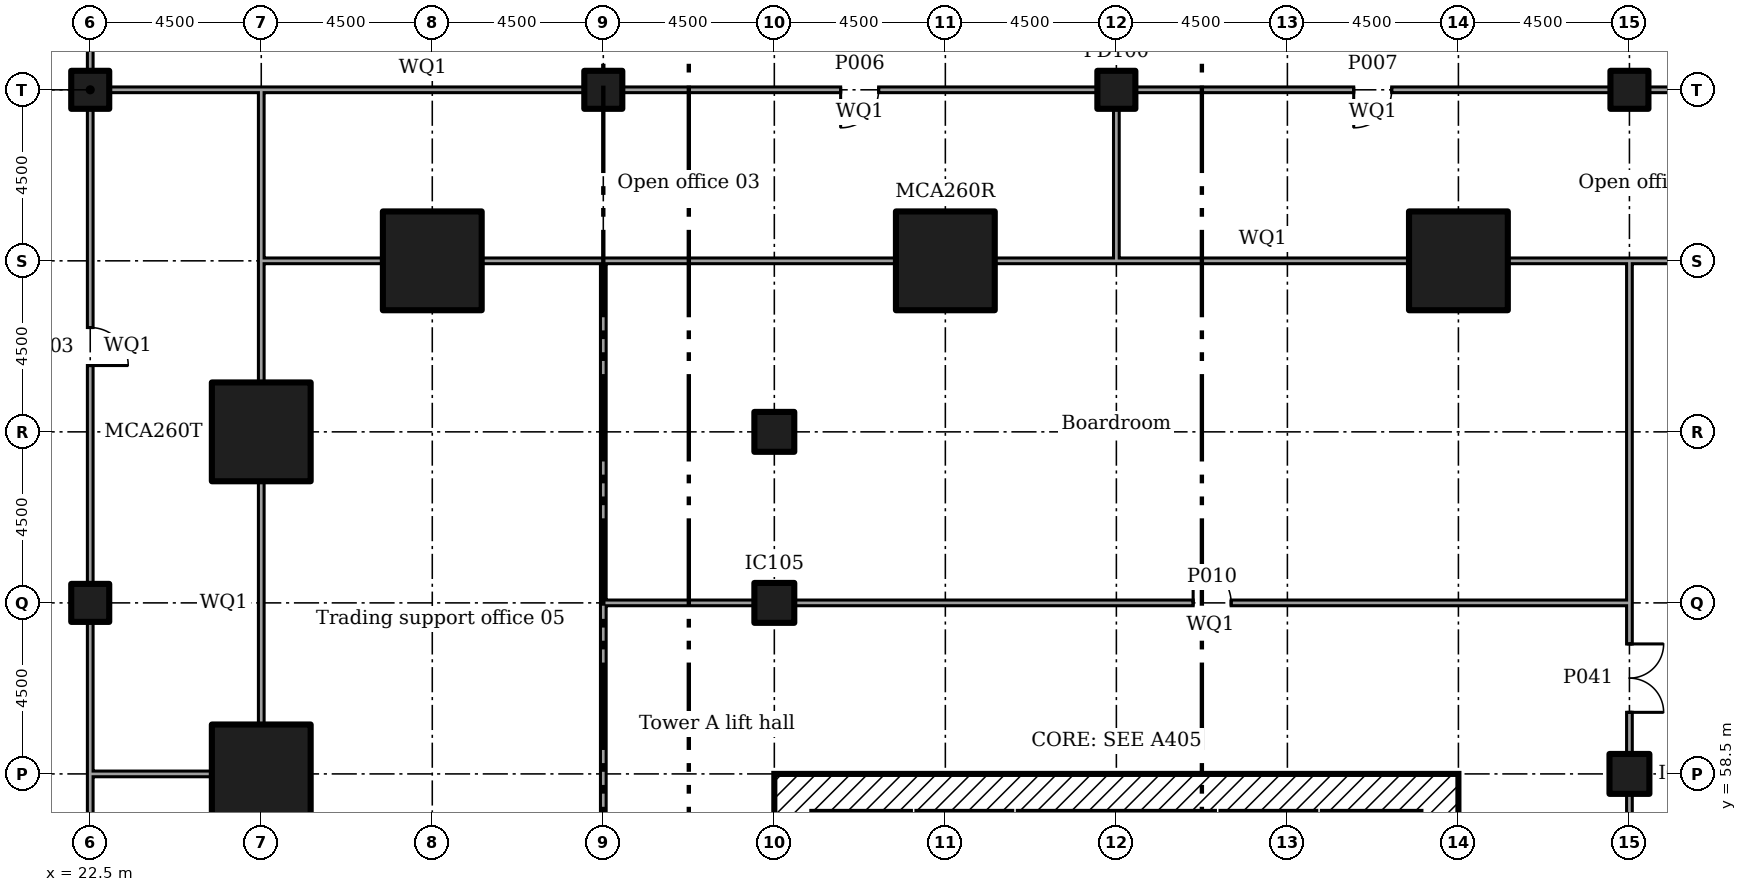
"""IFC4 building model, lengths in metres.
Left out: names, types, materials, properties, quantities, classifications, styles, units other than length and angle.
Written with IfcOpenShell. Run it as: python <this file> out.ifc"""

import sys

from ifc_helpers import new_model, si_unit, direction, frame, frame_2d, origin, origin_2d, place, context, subcontext, project, spatial, rectangle, extrude, element, fill, save


model = new_model("IFC4")
c1 = context("Model", 3, precision=1e-05, world=origin(), true_north=direction((0.0, 1.0)))
c2 = subcontext(c1, "Body", "Model", "MODEL_VIEW")
j1 = project(units=[si_unit("LENGTHUNIT", "METRE"), si_unit("PLANEANGLEUNIT", "RADIAN")], contexts=[c1])
p1 = place(None, origin())
s1 = spatial("IfcSite", under=j1, at=p1, CompositionType="ELEMENT")
p2 = place(p1, origin())
s2 = spatial("IfcBuilding", under=s1, at=p2, CompositionType="ELEMENT")
p3 = place(p2, frame((0.0, 0.0, 11.5)))
s3 = spatial("IfcBuildingStorey", under=s2, at=p3, CompositionType="ELEMENT", Elevation=11.5)
for number, where in (
    (1, (27.0, 58.5, 0.0)),
    (2, (27.0, 67.5, 0.0)),
    (3, (31.5, 72.0, 0.0)),
    (4, (45.0, 72.0, 0.0)),
    (5, (58.5, 72.0, 0.0)),
):
    element("IfcColumn", number, at=place(p3, frame(where)), inside=s3, PredefinedType="COLUMN", context=c2, shape_type="SweptSolid", body=[
        extrude(rectangle(XDim=2.6, YDim=2.6, at=origin_2d()), origin(), (0.0, 0.0, 1.0), 5.0),
    ])
for number, where in (
    (6, (40.5, 63.0, 0.0)),
    (7, (40.5, 67.5, 0.0)),
    (8, (63.0, 58.5, 0.0)),
):
    element("IfcColumn", number, at=place(p3, frame(where)), inside=s3, PredefinedType="COLUMN", context=c2, shape_type="SweptSolid", body=[
        extrude(rectangle(XDim=1.05, YDim=1.05, at=origin_2d()), origin(), (0.0, 0.0, 1.0), 5.0),
    ])
for number, where in (
    (9, (22.5, 63.0, 0.0)),
    (10, (22.5, 76.5, 0.0)),
    (11, (36.0, 76.5, 0.0)),
    (12, (49.5, 76.5, 0.0)),
    (13, (63.0, 76.5, 0.0)),
):
    element("IfcColumn", number, at=place(p3, frame(where)), inside=s3, PredefinedType="COLUMN", context=c2, shape_type="SweptSolid", body=[
        extrude(rectangle(XDim=1.0, YDim=1.0, at=origin_2d()), origin(), (0.0, 0.0, 1.0), 5.0),
    ])
p4 = place(p3, frame((58.0, 40.5, 0.0), z_axis=(0.0, 0.0, 1.0), x_axis=(0.0, 1.0, 0.0)))
e14 = element("IfcWall", 14, at=p4, inside=s3, PredefinedType="SHEAR", context=c2, shape_type="SweptSolid", body=[
    extrude(rectangle(XDim=18.0, YDim=1.0, at=frame_2d((9.0, 0.0))), origin(), (0.0, 0.0, 1.0), 4.5),
])
p5 = place(p4, frame((13.15, 0.0, 0.0)))
e15 = element("IfcOpeningElement", 15, at=p5, cuts=e14, PredefinedType="OPENING", context=c2, shape_type="SweptSolid", body=[
    extrude(rectangle(XDim=1.2, YDim=2.1, at=frame_2d((0.6, 1.05))), frame((0.0, 0.51, 0.0), z_axis=(0.0, -1.0, 0.0), x_axis=(1.0, 0.0, 0.0)), (0.0, 0.0, 1.0), 1.02),
])
p6 = place(p4, frame((3.9, 0.0, 0.0)))
e16 = element("IfcOpeningElement", 16, at=p6, cuts=e14, PredefinedType="OPENING", context=c2, shape_type="SweptSolid", body=[
    extrude(rectangle(XDim=1.8, YDim=2.1, at=frame_2d((0.9, 1.05))), frame((0.0, 0.51, 0.0), z_axis=(0.0, -1.0, 0.0), x_axis=(1.0, 0.0, 0.0)), (0.0, 0.0, 1.0), 1.02),
])
p7 = place(p4, frame((11.525, 0.0, 0.0)))
e17 = element("IfcOpeningElement", 17, at=p7, cuts=e14, PredefinedType="OPENING", context=c2, shape_type="SweptSolid", body=[
    extrude(rectangle(XDim=1.0, YDim=2.1, at=frame_2d((0.5, 1.05))), frame((0.0, 0.51, 0.0), z_axis=(0.0, -1.0, 0.0), x_axis=(1.0, 0.0, 0.0)), (0.0, 0.0, 1.0), 1.02),
])
p8 = place(p3, frame((41.5, 58.0, 0.0)))
e18 = element("IfcWall", 18, at=p8, inside=s3, PredefinedType="SHEAR", context=c2, shape_type="SweptSolid", body=[
    extrude(rectangle(XDim=16.0, YDim=1.0, at=frame_2d((8.0, 0.0))), origin(), (0.0, 0.0, 1.0), 4.5),
])
p9 = place(p3, frame((41.0, 40.5, 0.0), z_axis=(0.0, 0.0, 1.0), x_axis=(0.0, 1.0, 0.0)))
e19 = element("IfcWall", 19, at=p9, inside=s3, PredefinedType="SHEAR", context=c2, shape_type="SweptSolid", body=[
    extrude(rectangle(XDim=18.0, YDim=1.0, at=frame_2d((9.0, 0.0))), origin(), (0.0, 0.0, 1.0), 4.5),
])
p10 = place(p9, frame((3.65, 0.0, 0.0)))
e20 = element("IfcOpeningElement", 20, at=p10, cuts=e19, PredefinedType="OPENING", context=c2, shape_type="SweptSolid", body=[
    extrude(rectangle(XDim=1.2, YDim=2.1, at=frame_2d((0.6, 1.05))), frame((0.0, 0.51, 0.0), z_axis=(0.0, -1.0, 0.0), x_axis=(1.0, 0.0, 0.0)), (0.0, 0.0, 1.0), 1.02),
])
p11 = place(p9, frame((5.475, 0.0, 0.0)))
e21 = element("IfcOpeningElement", 21, at=p11, cuts=e19, PredefinedType="OPENING", context=c2, shape_type="SweptSolid", body=[
    extrude(rectangle(XDim=1.0, YDim=2.1, at=frame_2d((0.5, 1.05))), frame((0.0, 0.51, 0.0), z_axis=(0.0, -1.0, 0.0), x_axis=(1.0, 0.0, 0.0)), (0.0, 0.0, 1.0), 1.02),
])
p12 = place(p9, frame((12.3, 0.0, 0.0)))
e22 = element("IfcOpeningElement", 22, at=p12, cuts=e19, PredefinedType="OPENING", context=c2, shape_type="SweptSolid", body=[
    extrude(rectangle(XDim=1.0, YDim=2.1, at=frame_2d((0.5, 1.05))), frame((0.0, 0.51, 0.0), z_axis=(0.0, -1.0, 0.0), x_axis=(1.0, 0.0, 0.0)), (0.0, 0.0, 1.0), 1.02),
])
for number, where, z_axis, x_axis in (
    (23, (52.167, 57.5, 0.0), (0.0, 0.0, 1.0), (0.0, -1.0, 0.0)),
    (24, (54.833, 57.5, 0.0), (0.0, 0.0, 1.0), (0.0, -1.0, 0.0)),
):
    element("IfcWall", number, at=place(p3, frame(where, z_axis=z_axis, x_axis=x_axis)), inside=s3, PredefinedType="SHEAR", context=c2, shape_type="SweptSolid", body=[
        extrude(rectangle(XDim=2.3, YDim=0.2, at=frame_2d((1.15, 0.0))), origin(), (0.0, 0.0, 1.0), 4.5),
    ])
p13 = place(p3, frame((22.5, 76.995, 0.0), z_axis=(0.0, 0.0, 1.0), x_axis=(0.0, 1.0, 0.0)))
e25 = element("IfcWall", 25, at=p13, inside=s3, PredefinedType="PARTITIONING", context=c2, shape_type="SweptSolid", body=[
    extrude(rectangle(XDim=3.705, YDim=0.15, at=frame_2d((1.853, 0.0))), origin(), (0.0, 0.0, 1.0), 4.55),
])
p14 = place(p13, frame((1.25, 0.0, 0.0)))
e26 = element("IfcOpeningElement", 26, at=p14, cuts=e25, PredefinedType="OPENING", context=c2, shape_type="SweptSolid", body=[
    extrude(rectangle(XDim=1.2, YDim=2.1, at=frame_2d((0.6, 1.05))), frame((0.0, 0.085, 0.0), z_axis=(0.0, -1.0, 0.0), x_axis=(1.0, 0.0, 0.0)), (0.0, 0.0, 1.0), 0.17),
])
p15 = place(p3, frame((22.5, 49.995, 0.0), z_axis=(0.0, 0.0, 1.0), x_axis=(0.0, 1.0, 0.0)))
e27 = element("IfcWall", 27, at=p15, inside=s3, PredefinedType="PARTITIONING", context=c2, shape_type="SweptSolid", body=[
    extrude(rectangle(XDim=8.58, YDim=0.15, at=frame_2d((4.29, 0.0))), origin(), (0.0, 0.0, 1.0), 4.55),
])
p16 = place(p3, frame((22.5, 58.5, 0.0), z_axis=(0.0, 0.0, 1.0), x_axis=(0.0, 1.0, 0.0)))
e28 = element("IfcWall", 28, at=p16, inside=s3, PredefinedType="PARTITIONING", context=c2, shape_type="SweptSolid", body=[
    extrude(rectangle(XDim=4.005, YDim=0.15, at=frame_2d((2.002, 0.0))), origin(), (0.0, 0.0, 1.0), 4.55),
])
p17 = place(p3, frame((22.5, 63.495, 0.0), z_axis=(0.0, 0.0, 1.0), x_axis=(0.0, 1.0, 0.0)))
e29 = element("IfcWall", 29, at=p17, inside=s3, PredefinedType="PARTITIONING", context=c2, shape_type="SweptSolid", body=[
    extrude(rectangle(XDim=12.51, YDim=0.15, at=frame_2d((6.255, 0.0))), origin(), (0.0, 0.0, 1.0), 4.55),
])
p18 = place(p17, frame((5.75, 0.0, 0.0)))
e30 = element("IfcOpeningElement", 30, at=p18, cuts=e29, PredefinedType="OPENING", context=c2, shape_type="SweptSolid", body=[
    extrude(rectangle(XDim=1.0, YDim=2.1, at=frame_2d((0.5, 1.05))), frame((0.0, 0.085, 0.0), z_axis=(0.0, -1.0, 0.0), x_axis=(1.0, 0.0, 0.0)), (0.0, 0.0, 1.0), 0.17),
])
p19 = place(p3, frame((22.995, 76.5, 0.0)))
e31 = element("IfcWall", 31, at=p19, inside=s3, PredefinedType="PARTITIONING", context=c2, shape_type="SweptSolid", body=[
    extrude(rectangle(XDim=4.08, YDim=0.15, at=frame_2d((2.04, 0.0))), origin(), (0.0, 0.0, 1.0), 4.55),
])
p20 = place(p3, frame((27.0, 76.5, 0.0)))
e32 = element("IfcWall", 32, at=p20, inside=s3, PredefinedType="PARTITIONING", context=c2, shape_type="SweptSolid", body=[
    extrude(rectangle(XDim=8.505, YDim=0.15, at=frame_2d((4.252, 0.0))), origin(), (0.0, 0.0, 1.0), 4.55),
])
p21 = place(p3, frame((36.495, 76.5, 0.0)))
e33 = element("IfcWall", 33, at=p21, inside=s3, PredefinedType="PARTITIONING", context=c2, shape_type="SweptSolid", body=[
    extrude(rectangle(XDim=12.51, YDim=0.15, at=frame_2d((6.255, 0.0))), origin(), (0.0, 0.0, 1.0), 4.55),
])
p22 = place(p21, frame((5.75, 0.0, 0.0)))
e34 = element("IfcOpeningElement", 34, at=p22, cuts=e33, PredefinedType="OPENING", context=c2, shape_type="SweptSolid", body=[
    extrude(rectangle(XDim=1.0, YDim=2.1, at=frame_2d((0.5, 1.05))), frame((0.0, 0.085, 0.0), z_axis=(0.0, -1.0, 0.0), x_axis=(1.0, 0.0, 0.0)), (0.0, 0.0, 1.0), 0.17),
])
p23 = place(p3, frame((49.995, 76.5, 0.0)))
e35 = element("IfcWall", 35, at=p23, inside=s3, PredefinedType="PARTITIONING", context=c2, shape_type="SweptSolid", body=[
    extrude(rectangle(XDim=12.51, YDim=0.15, at=frame_2d((6.255, 0.0))), origin(), (0.0, 0.0, 1.0), 4.55),
])
p24 = place(p23, frame((5.75, 0.0, 0.0)))
e36 = element("IfcOpeningElement", 36, at=p24, cuts=e35, PredefinedType="OPENING", context=c2, shape_type="SweptSolid", body=[
    extrude(rectangle(XDim=1.0, YDim=2.1, at=frame_2d((0.5, 1.05))), frame((0.0, 0.085, 0.0), z_axis=(0.0, -1.0, 0.0), x_axis=(1.0, 0.0, 0.0)), (0.0, 0.0, 1.0), 0.17),
])
p25 = place(p3, frame((63.495, 76.5, 0.0)))
e37 = element("IfcWall", 37, at=p25, inside=s3, PredefinedType="PARTITIONING", context=c2, shape_type="SweptSolid", body=[
    extrude(rectangle(XDim=8.58, YDim=0.15, at=frame_2d((4.29, 0.0))), origin(), (0.0, 0.0, 1.0), 4.55),
])
p26 = place(p3, frame((22.575, 58.5, 0.0)))
e38 = element("IfcWall", 38, at=p26, inside=s3, PredefinedType="PARTITIONING", context=c2, shape_type="SweptSolid", body=[
    extrude(rectangle(XDim=3.13, YDim=0.15, at=frame_2d((1.565, 0.0))), origin(), (0.0, 0.0, 1.0), 4.55),
])
p27 = place(p3, frame((27.0, 71.925, 0.0), z_axis=(0.0, 0.0, 1.0), x_axis=(0.0, 1.0, 0.0)))
e39 = element("IfcWall", 39, at=p27, inside=s3, PredefinedType="PARTITIONING", context=c2, shape_type="SweptSolid", body=[
    extrude(rectangle(XDim=4.5, YDim=0.15, at=frame_2d((2.25, 0.0))), origin(), (0.0, 0.0, 1.0), 4.55),
])
p28 = place(p3, frame((27.0, 59.795, 0.0), z_axis=(0.0, 0.0, 1.0), x_axis=(0.0, 1.0, 0.0)))
e40 = element("IfcWall", 40, at=p28, inside=s3, PredefinedType="PARTITIONING", context=c2, shape_type="SweptSolid", body=[
    extrude(rectangle(XDim=6.41, YDim=0.15, at=frame_2d((3.205, 0.0))), origin(), (0.0, 0.0, 1.0), 4.55),
])
p29 = place(p3, frame((27.0, 68.795, 0.0), z_axis=(0.0, 0.0, 1.0), x_axis=(0.0, 1.0, 0.0)))
e41 = element("IfcWall", 41, at=p29, inside=s3, PredefinedType="PARTITIONING", context=c2, shape_type="SweptSolid", body=[
    extrude(rectangle(XDim=3.205, YDim=0.15, at=frame_2d((1.603, 0.0))), origin(), (0.0, 0.0, 1.0), 4.55),
])
p30 = place(p3, frame((49.5, 71.925, 0.0), z_axis=(0.0, 0.0, 1.0), x_axis=(0.0, 1.0, 0.0)))
e42 = element("IfcWall", 42, at=p30, inside=s3, PredefinedType="PARTITIONING", context=c2, shape_type="SweptSolid", body=[
    extrude(rectangle(XDim=4.08, YDim=0.15, at=frame_2d((2.04, 0.0))), origin(), (0.0, 0.0, 1.0), 4.55),
])
p31 = place(p3, frame((35.925, 72.0, 0.0)))
e43 = element("IfcWall", 43, at=p31, inside=s3, PredefinedType="PARTITIONING", context=c2, shape_type="SweptSolid", body=[
    extrude(rectangle(XDim=7.78, YDim=0.15, at=frame_2d((3.89, 0.0))), origin(), (0.0, 0.0, 1.0), 4.55),
])
for number, where in (
    (44, (46.295, 72.0, 0.0)),
    (45, (27.075, 72.0, 0.0)),
):
    element("IfcWall", number, at=place(p3, frame(where)), inside=s3, PredefinedType="PARTITIONING", context=c2, shape_type="SweptSolid", body=[
        extrude(rectangle(XDim=3.13, YDim=0.15, at=frame_2d((1.565, 0.0))), origin(), (0.0, 0.0, 1.0), 4.55),
    ])
p32 = place(p3, frame((32.795, 72.0, 0.0)))
e46 = element("IfcWall", 46, at=p32, inside=s3, PredefinedType="PARTITIONING", context=c2, shape_type="SweptSolid", body=[
    extrude(rectangle(XDim=3.205, YDim=0.15, at=frame_2d((1.603, 0.0))), origin(), (0.0, 0.0, 1.0), 4.55),
])
p33 = place(p3, frame((62.925, 72.0, 0.0)))
e47 = element("IfcWall", 47, at=p33, inside=s3, PredefinedType="PARTITIONING", context=c2, shape_type="SweptSolid", body=[
    extrude(rectangle(XDim=3.28, YDim=0.15, at=frame_2d((1.64, 0.0))), origin(), (0.0, 0.0, 1.0), 4.55),
])
p34 = place(p3, frame((49.5, 72.0, 0.0)))
e48 = element("IfcWall", 48, at=p34, inside=s3, PredefinedType="PARTITIONING", context=c2, shape_type="SweptSolid", body=[
    extrude(rectangle(XDim=7.705, YDim=0.15, at=frame_2d((3.853, 0.0))), origin(), (0.0, 0.0, 1.0), 4.55),
])
p35 = place(p3, frame((59.795, 72.0, 0.0)))
e49 = element("IfcWall", 49, at=p35, inside=s3, PredefinedType="PARTITIONING", context=c2, shape_type="SweptSolid", body=[
    extrude(rectangle(XDim=3.205, YDim=0.15, at=frame_2d((1.603, 0.0))), origin(), (0.0, 0.0, 1.0), 4.55),
])
p36 = place(p3, frame((63.0, 62.925, 0.0), z_axis=(0.0, 0.0, 1.0), x_axis=(0.0, 1.0, 0.0)))
e50 = element("IfcWall", 50, at=p36, inside=s3, PredefinedType="PARTITIONING", context=c2, shape_type="SweptSolid", body=[
    extrude(rectangle(XDim=9.0, YDim=0.15, at=frame_2d((4.5, 0.0))), origin(), (0.0, 0.0, 1.0), 4.55),
])
p37 = place(p3, frame((63.0, 36.0, 0.0), z_axis=(0.0, 0.0, 1.0), x_axis=(0.0, 1.0, 0.0)))
e51 = element("IfcWall", 51, at=p37, inside=s3, PredefinedType="PARTITIONING", context=c2, shape_type="SweptSolid", body=[
    extrude(rectangle(XDim=21.98, YDim=0.15, at=frame_2d((10.99, 0.0))), origin(), (0.0, 0.0, 1.0), 4.55),
])
p38 = place(p37, frame((10.1, 0.0, 0.0)))
e52 = element("IfcOpeningElement", 52, at=p38, cuts=e51, PredefinedType="OPENING", context=c2, shape_type="SweptSolid", body=[
    extrude(rectangle(XDim=1.8, YDim=2.1, at=frame_2d((0.9, 1.05))), frame((0.0, 0.085, 0.0), z_axis=(0.0, -1.0, 0.0), x_axis=(1.0, 0.0, 0.0)), (0.0, 0.0, 1.0), 0.17),
])
p39 = place(p3, frame((63.0, 59.02, 0.0), z_axis=(0.0, 0.0, 1.0), x_axis=(0.0, 1.0, 0.0)))
e53 = element("IfcWall", 53, at=p39, inside=s3, PredefinedType="PARTITIONING", context=c2, shape_type="SweptSolid", body=[
    extrude(rectangle(XDim=3.98, YDim=0.15, at=frame_2d((1.99, 0.0))), origin(), (0.0, 0.0, 1.0), 4.55),
])
p40 = place(p39, frame((1.1, 0.0, 0.0)))
e54 = element("IfcOpeningElement", 54, at=p40, cuts=e53, PredefinedType="OPENING", context=c2, shape_type="SweptSolid", body=[
    extrude(rectangle(XDim=1.8, YDim=2.1, at=frame_2d((0.9, 1.05))), frame((0.0, 0.085, 0.0), z_axis=(0.0, -1.0, 0.0), x_axis=(1.0, 0.0, 0.0)), (0.0, 0.0, 1.0), 0.17),
])
p41 = place(p3, frame((36.0, 62.925, 0.0), z_axis=(0.0, 0.0, 1.0), x_axis=(0.0, 1.0, 0.0)))
e55 = element("IfcWall", 55, at=p41, inside=s3, PredefinedType="PARTITIONING", context=c2, shape_type="SweptSolid", body=[
    extrude(rectangle(XDim=9.0, YDim=0.15, at=frame_2d((4.5, 0.0))), origin(), (0.0, 0.0, 1.0), 4.55),
])
p42 = place(p3, frame((36.075, 63.0, 0.0)))
e56 = element("IfcWall", 56, at=p42, inside=s3, PredefinedType="PARTITIONING", context=c2, shape_type="SweptSolid", body=[
    extrude(rectangle(XDim=3.905, YDim=0.15, at=frame_2d((1.953, 0.0))), origin(), (0.0, 0.0, 1.0), 4.55),
])
p43 = place(p3, frame((41.02, 63.0, 0.0)))
e57 = element("IfcWall", 57, at=p43, inside=s3, PredefinedType="PARTITIONING", context=c2, shape_type="SweptSolid", body=[
    extrude(rectangle(XDim=21.905, YDim=0.15, at=frame_2d((10.953, 0.0))), origin(), (0.0, 0.0, 1.0), 4.55),
])
p44 = place(p43, frame((10.5, 0.0, 0.0)))
e58 = element("IfcOpeningElement", 58, at=p44, cuts=e57, PredefinedType="OPENING", context=c2, shape_type="SweptSolid", body=[
    extrude(rectangle(XDim=1.0, YDim=2.1, at=frame_2d((0.5, 1.05))), frame((0.0, 0.085, 0.0), z_axis=(0.0, -1.0, 0.0), x_axis=(1.0, 0.0, 0.0)), (0.0, 0.0, 1.0), 0.17),
])
p45 = place(p3, frame((36.0, 49.5, 0.0), z_axis=(0.0, 0.0, 1.0), x_axis=(0.0, 1.0, 0.0)))
e59 = element("IfcWall", 59, at=p45, inside=s3, PredefinedType="PARTITIONING", context=c2, shape_type="SweptSolid", body=[
    extrude(rectangle(XDim=13.5, YDim=0.15, at=frame_2d((6.75, 0.0))), origin(), (0.0, 0.0, 1.0), 4.55),
])
p46 = place(p45, frame((6.25, 0.0, 0.0)))
e60 = element("IfcOpeningElement", 60, at=p46, cuts=e59, PredefinedType="OPENING", context=c2, shape_type="SweptSolid", body=[
    extrude(rectangle(XDim=1.0, YDim=2.1, at=frame_2d((0.5, 1.05))), frame((0.0, 0.085, 0.0), z_axis=(0.0, -1.0, 0.0), x_axis=(1.0, 0.0, 0.0)), (0.0, 0.0, 1.0), 0.17),
])
p47 = place(p18, frame((1.0, 0.0, 0.0), x_axis=(-1.0, 0.0, 0.0)))
e61 = element("IfcDoor", 61, at=p47, inside=s3, OperationType="SINGLE_SWING_LEFT", PredefinedType="DOOR", context=c2, shape_type="SweptSolid", body=[
    extrude(rectangle(XDim=1.0, YDim=2.1, at=frame_2d((0.5, 1.05))), frame((0.0, 0.025, 0.0), z_axis=(0.0, -1.0, 0.0), x_axis=(1.0, 0.0, 0.0)), (0.0, 0.0, 1.0), 0.05),
])
fill(e30, e61)
p48 = place(p22, frame((1.0, 0.0, 0.0), x_axis=(-1.0, 0.0, 0.0)))
e62 = element("IfcDoor", 62, at=p48, inside=s3, OperationType="SINGLE_SWING_LEFT", PredefinedType="DOOR", context=c2, shape_type="SweptSolid", body=[
    extrude(rectangle(XDim=1.0, YDim=2.1, at=frame_2d((0.5, 1.05))), frame((0.0, 0.025, 0.0), z_axis=(0.0, -1.0, 0.0), x_axis=(1.0, 0.0, 0.0)), (0.0, 0.0, 1.0), 0.05),
])
fill(e34, e62)
p49 = place(p24, frame((1.0, 0.0, 0.0), x_axis=(-1.0, 0.0, 0.0)))
e63 = element("IfcDoor", 63, at=p49, inside=s3, OperationType="SINGLE_SWING_LEFT", PredefinedType="DOOR", context=c2, shape_type="SweptSolid", body=[
    extrude(rectangle(XDim=1.0, YDim=2.1, at=frame_2d((0.5, 1.05))), frame((0.0, 0.025, 0.0), z_axis=(0.0, -1.0, 0.0), x_axis=(1.0, 0.0, 0.0)), (0.0, 0.0, 1.0), 0.05),
])
fill(e36, e63)
p50 = place(p44, origin())
e64 = element("IfcDoor", 64, at=p50, inside=s3, OperationType="SINGLE_SWING_RIGHT", PredefinedType="DOOR", context=c2, shape_type="SweptSolid", body=[
    extrude(rectangle(XDim=1.0, YDim=2.1, at=frame_2d((0.5, 1.05))), frame((0.0, 0.025, 0.0), z_axis=(0.0, -1.0, 0.0), x_axis=(1.0, 0.0, 0.0)), (0.0, 0.0, 1.0), 0.05),
])
fill(e58, e64)
p51 = place(p40, frame((1.8, 0.0, 0.0), x_axis=(-1.0, 0.0, 0.0)))
e65 = element("IfcDoor", 65, at=p51, inside=s3, OperationType="DOUBLE_DOOR_SINGLE_SWING", PredefinedType="DOOR", context=c2, shape_type="SweptSolid", body=[
    extrude(rectangle(XDim=1.8, YDim=2.1, at=frame_2d((0.9, 1.05))), frame((0.0, 0.025, 0.0), z_axis=(0.0, -1.0, 0.0), x_axis=(1.0, 0.0, 0.0)), (0.0, 0.0, 1.0), 0.05),
])
fill(e54, e65)
save(model, sys.argv[1])
